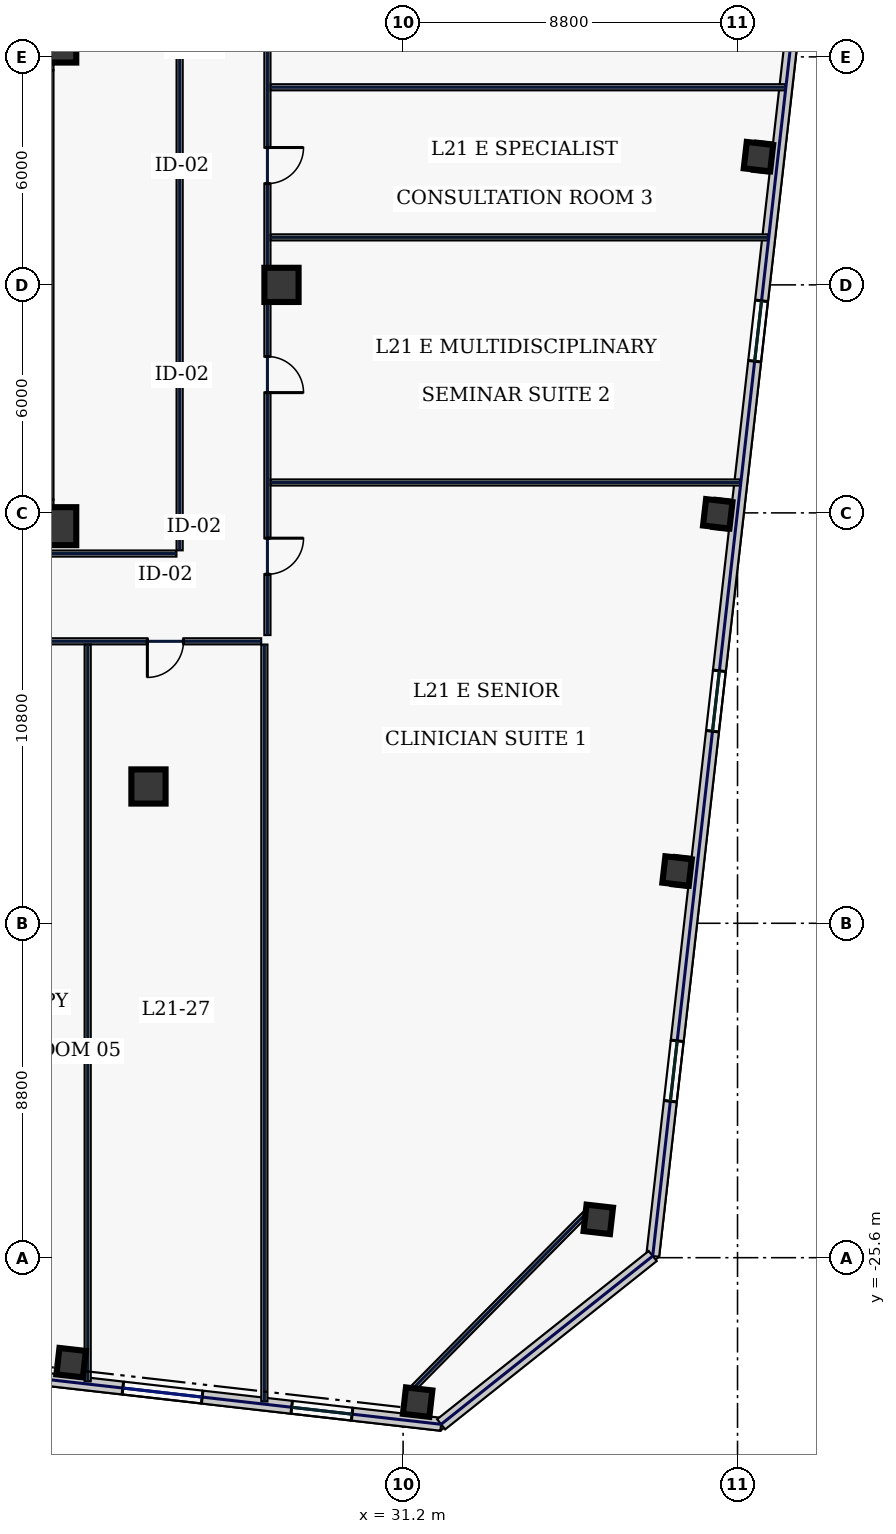
"""IFC4 building model, lengths in metres.
Left out: names, types, materials, properties, quantities, classifications, styles, units other than length and angle.
Written with IfcOpenShell. Run it as: python <this file> out.ifc"""

import sys

from ifc_helpers import new_model, si_unit, direction, frame, frame_2d, origin, origin_2d, place, context, subcontext, project, spatial, rectangle, hollow_rectangle, extrude, element, fill, save


model = new_model("IFC4")
c1 = context("Model", 3, precision=1e-05, world=origin(), true_north=direction((0.0, 1.0)))
c2 = subcontext(c1, "Body", "Model", "MODEL_VIEW")
j1 = project(units=[si_unit("LENGTHUNIT", "METRE"), si_unit("PLANEANGLEUNIT", "RADIAN")], contexts=[c1])
p1 = place(None, origin())
s1 = spatial("IfcSite", under=j1, at=p1, CompositionType="ELEMENT")
p2 = place(p1, origin())
s2 = spatial("IfcBuilding", under=s1, at=p2, CompositionType="ELEMENT")
p3 = place(p2, frame((0.0, 0.0, 97.4)))
s3 = spatial("IfcBuildingStorey", under=s2, at=p3, CompositionType="ELEMENT", Elevation=97.4)
for number, where, z_axis, x_axis in (
    (1, (10.45, 6.0, 0.0), (0.0, 0.0, 1.0), (1.0, 0.0, 0.0)),
    (2, (10.45, -6.0, 0.0), (0.0, 0.0, 1.0), (1.0, 0.0, 0.0)),
):
    element("IfcWall", number, at=place(p3, frame(where, z_axis=z_axis, x_axis=x_axis)), inside=s3, PredefinedType="SHEAR", context=c2, shape_type="SweptSolid", body=[
        extrude(rectangle(XDim=11.55, YDim=0.7, at=frame_2d((5.775, 0.0))), origin(), (0.0, 0.0, 1.0), 3.74),
    ])
p4 = place(p3, frame((21.6, -5.65, 0.0), z_axis=(0.0, 0.0, 1.0), x_axis=(0.0, 1.0, 0.0)))
e3 = element("IfcWall", 3, at=p4, inside=s3, PredefinedType="SHEAR", context=c2, shape_type="SweptSolid", body=[
    extrude(rectangle(XDim=11.3, YDim=0.8, at=frame_2d((5.65, 0.0))), origin(), (0.0, 0.0, 1.0), 3.74),
])
for number, where, z_axis, x_axis in (
    (4, (22.1, -6.35, 0.0), (0.0, 0.0, 1.0), (1.0, 0.0, 0.0)),
    (5, (22.1, 6.35, 0.0), (0.0, 0.0, 1.0), (1.0, 0.0, 0.0)),
):
    element("IfcColumn", number, at=place(p3, frame(where, z_axis=z_axis, x_axis=x_axis)), inside=s3, PredefinedType="COLUMN", context=c2, shape_type="SweptSolid", body=[
        extrude(hollow_rectangle(XDim=1.0, YDim=1.0, WallThickness=0.045, at=origin_2d()), origin(), (0.0, 0.0, 1.0), 3.74),
    ])
for number, where, z_axis, x_axis in (
    (6, (24.5, -13.2, 0.0), (0.0, 0.0, 1.0), (1.0, 0.0, 0.0)),
    (7, (28.0, 0.0, 0.0), (0.0, 0.0, 1.0), (1.0, 0.0, 0.0)),
):
    element("IfcColumn", number, at=place(p3, frame(where, z_axis=z_axis, x_axis=x_axis)), inside=s3, PredefinedType="COLUMN", context=c2, shape_type="SweptSolid", body=[
        extrude(hollow_rectangle(XDim=0.9, YDim=0.9, WallThickness=0.04, at=origin_2d()), origin(), (0.0, 0.0, 1.0), 3.74),
    ])
for number, where, z_axis, x_axis in (
    (8, (22.465, -28.362, 0.0), (0.0, 0.0, 1.0), (0.994, -0.113, 0.0)),
    (9, (31.583, -29.401, 0.0), (0.0, 0.0, 1.0), (0.994, -0.113, 0.0)),
    (10, (36.336, -24.592, 0.0), (0.0, 0.0, 1.0), (0.994, -0.113, 0.0)),
    (11, (38.409, -15.424, 0.0), (0.0, 0.0, 1.0), (0.994, -0.113, 0.0)),
    (12, (39.48, -6.025, 0.0), (0.0, 0.0, 1.0), (0.994, -0.113, 0.0)),
    (13, (40.551, 3.375, 0.0), (0.0, 0.0, 1.0), (0.994, -0.113, 0.0)),
):
    element("IfcColumn", number, at=place(p3, frame(where, z_axis=z_axis, x_axis=x_axis)), inside=s3, PredefinedType="COLUMN", context=c2, shape_type="SweptSolid", body=[
        extrude(hollow_rectangle(XDim=0.7, YDim=0.7, WallThickness=0.032, at=origin_2d()), origin(), (0.0, 0.0, 1.0), 3.74),
    ])
p5 = place(p3, frame((11.115, -27.582, 0.0), z_axis=(0.0, 0.0, 1.0), x_axis=(0.993572655904, -0.113196190044, 0.0)))
e14 = element("IfcWall", 14, at=p5, inside=s3, PredefinedType="STANDARD", context=c2, shape_type="SweptSolid", body=[
    extrude(rectangle(XDim=21.223, YDim=0.34, at=frame_2d((10.611, 0.0))), origin(), (0.0, 0.0, 1.0), 3.74),
])
p6 = place(p5, frame((4.866, 0.0, 0.67)))
e15 = element("IfcOpeningElement", 15, at=p6, cuts=e14, PredefinedType="OPENING", context=c2, shape_type="SweptSolid", body=[
    extrude(rectangle(XDim=0.85, YDim=1.85, at=frame_2d((0.425, 0.925))), frame((0.0, 0.18, 0.0), z_axis=(0.0, -1.0, 0.0), x_axis=(1.0, 0.0, 0.0)), (0.0, 0.0, 1.0), 0.36),
])
p7 = place(p5, frame((7.838, 0.0, 0.67)))
e16 = element("IfcOpeningElement", 16, at=p7, cuts=e14, PredefinedType="OPENING", context=c2, shape_type="SweptSolid", body=[
    extrude(rectangle(XDim=2.1, YDim=2.2, at=frame_2d((1.05, 1.1))), frame((0.0, 0.18, 0.0), z_axis=(0.0, -1.0, 0.0), x_axis=(1.0, 0.0, 0.0)), (0.0, 0.0, 1.0), 0.36),
])
p8 = place(p5, frame((12.794, 0.0, 0.67)))
e17 = element("IfcOpeningElement", 17, at=p8, cuts=e14, PredefinedType="OPENING", context=c2, shape_type="SweptSolid", body=[
    extrude(rectangle(XDim=2.1, YDim=2.2, at=frame_2d((1.05, 1.1))), frame((0.0, 0.18, 0.0), z_axis=(0.0, -1.0, 0.0), x_axis=(1.0, 0.0, 0.0)), (0.0, 0.0, 1.0), 0.36),
])
p9 = place(p5, frame((17.265, 0.0, 0.22)))
e18 = element("IfcOpeningElement", 18, at=p9, cuts=e14, PredefinedType="OPENING", context=c2, shape_type="SweptSolid", body=[
    extrude(rectangle(XDim=1.6, YDim=1.2, at=frame_2d((0.8, 0.6))), frame((0.0, 0.18, 0.0), z_axis=(0.0, -1.0, 0.0), x_axis=(1.0, 0.0, 0.0)), (0.0, 0.0, 1.0), 0.36),
])
p10 = place(p3, frame((37.768, -25.556, 0.0), z_axis=(0.0, 0.0, 1.0), x_axis=(0.113201605824, 0.993572038877, 0.0)))
e19 = element("IfcWall", 19, at=p10, inside=s3, PredefinedType="STANDARD", context=c2, shape_type="SweptSolid", body=[
    extrude(rectangle(XDim=39.2, YDim=0.34, at=frame_2d((19.6, 0.0))), origin(), (0.0, 0.0, 1.0), 3.74),
])
p11 = place(p10, frame((4.1, 0.0, 0.58)))
e20 = element("IfcOpeningElement", 20, at=p11, cuts=e19, PredefinedType="OPENING", context=c2, shape_type="SweptSolid", body=[
    extrude(rectangle(XDim=1.6, YDim=2.3, at=frame_2d((0.8, 1.15))), frame((0.0, 0.18, 0.0), z_axis=(0.0, -1.0, 0.0), x_axis=(1.0, 0.0, 0.0)), (0.0, 0.0, 1.0), 0.36),
])
p12 = place(p10, frame((13.9, 0.0, 0.58)))
e21 = element("IfcOpeningElement", 21, at=p12, cuts=e19, PredefinedType="OPENING", context=c2, shape_type="SweptSolid", body=[
    extrude(rectangle(XDim=1.6, YDim=2.3, at=frame_2d((0.8, 1.15))), frame((0.0, 0.18, 0.0), z_axis=(0.0, -1.0, 0.0), x_axis=(1.0, 0.0, 0.0)), (0.0, 0.0, 1.0), 0.36),
])
p13 = place(p10, frame((23.7, 0.0, 0.58)))
e22 = element("IfcOpeningElement", 22, at=p13, cuts=e19, PredefinedType="OPENING", context=c2, shape_type="SweptSolid", body=[
    extrude(rectangle(XDim=1.6, YDim=2.3, at=frame_2d((0.8, 1.15))), frame((0.0, 0.18, 0.0), z_axis=(0.0, -1.0, 0.0), x_axis=(1.0, 0.0, 0.0)), (0.0, 0.0, 1.0), 0.36),
])
p14 = place(p10, frame((33.5, 0.0, 0.58)))
e23 = element("IfcOpeningElement", 23, at=p14, cuts=e19, PredefinedType="OPENING", context=c2, shape_type="SweptSolid", body=[
    extrude(rectangle(XDim=1.6, YDim=2.3, at=frame_2d((0.8, 1.15))), frame((0.0, 0.18, 0.0), z_axis=(0.0, -1.0, 0.0), x_axis=(1.0, 0.0, 0.0)), (0.0, 0.0, 1.0), 0.36),
])
p15 = place(p3, frame((32.201, -29.985, 0.0), z_axis=(0.0, 0.0, 1.0), x_axis=(0.78261359446, 0.622507800567, 0.0)))
e24 = element("IfcWall", 24, at=p15, inside=s3, PredefinedType="STANDARD", context=c2, shape_type="SweptSolid", body=[
    extrude(rectangle(XDim=7.114, YDim=0.34, at=frame_2d((3.557, 0.0))), origin(), (0.0, 0.0, 1.0), 3.74),
])
p16 = place(p3, frame((31.341, -29.162, 0.0), z_axis=(0.0, 0.0, 1.0), x_axis=(0.702905898933, 0.711282853192, 0.0)))
e25 = element("IfcWall", 25, at=p16, inside=s3, PredefinedType="PARTITIONING", context=c2, shape_type="SweptSolid", body=[
    extrude(rectangle(XDim=6.761, YDim=0.16, at=frame_2d((3.381, 0.0))), origin(), (0.0, 0.0, 1.0), 3.74),
])
p17 = place(p3, frame((27.63, 9.415, 0.0), z_axis=(0.0, 0.0, 1.0), x_axis=(0.0, -1.0, 0.0)))
e26 = element("IfcWall", 26, at=p17, inside=s3, PredefinedType="PARTITIONING", context=c2, shape_type="SweptSolid", body=[
    extrude(rectangle(XDim=18.63, YDim=0.16, at=frame_2d((9.315, 0.0))), origin(), (0.0, 0.0, 1.0), 3.74),
])
p18 = place(p17, frame((16.081, 0.0, 0.0)))
e27 = element("IfcOpeningElement", 27, at=p18, cuts=e26, PredefinedType="OPENING", context=c2, shape_type="SweptSolid", body=[
    extrude(rectangle(XDim=0.95, YDim=2.2, at=frame_2d((0.475, 1.1))), frame((0.0, 0.09, 0.0), z_axis=(0.0, -1.0, 0.0), x_axis=(1.0, 0.0, 0.0)), (0.0, 0.0, 1.0), 0.18),
])
p19 = place(p17, frame((11.3, 0.0, 0.0)))
e28 = element("IfcOpeningElement", 28, at=p19, cuts=e26, PredefinedType="OPENING", context=c2, shape_type="SweptSolid", body=[
    extrude(rectangle(XDim=0.95, YDim=2.2, at=frame_2d((0.475, 1.1))), frame((0.0, 0.09, 0.0), z_axis=(0.0, -1.0, 0.0), x_axis=(1.0, 0.0, 0.0)), (0.0, 0.0, 1.0), 0.18),
])
p20 = place(p17, frame((5.8, 0.0, 0.0)))
e29 = element("IfcOpeningElement", 29, at=p20, cuts=e26, PredefinedType="OPENING", context=c2, shape_type="SweptSolid", body=[
    extrude(rectangle(XDim=0.95, YDim=2.2, at=frame_2d((0.475, 1.1))), frame((0.0, 0.09, 0.0), z_axis=(0.0, -1.0, 0.0), x_axis=(1.0, 0.0, 0.0)), (0.0, 0.0, 1.0), 0.18),
])
p21 = place(p17, frame((1.869, 0.0, 0.0)))
e30 = element("IfcOpeningElement", 30, at=p21, cuts=e26, PredefinedType="OPENING", context=c2, shape_type="SweptSolid", body=[
    extrude(rectangle(XDim=0.95, YDim=2.2, at=frame_2d((0.475, 1.1))), frame((0.0, 0.09, 0.0), z_axis=(0.0, -1.0, 0.0), x_axis=(1.0, 0.0, 0.0)), (0.0, 0.0, 1.0), 0.18),
])
p22 = place(p3, frame((27.465, -9.38, 0.0), z_axis=(0.0, 0.0, 1.0), x_axis=(-1.0, 0.0, 0.0)))
e31 = element("IfcWall", 31, at=p22, inside=s3, PredefinedType="PARTITIONING", context=c2, shape_type="SweptSolid", body=[
    extrude(rectangle(XDim=54.93, YDim=0.16, at=frame_2d((27.465, 0.0))), origin(), (0.0, 0.0, 1.0), 3.74),
])
p23 = place(p22, frame((52.106, 0.0, 0.0)))
e32 = element("IfcOpeningElement", 32, at=p23, cuts=e31, PredefinedType="OPENING", context=c2, shape_type="SweptSolid", body=[
    extrude(rectangle(XDim=1.05, YDim=2.2, at=frame_2d((0.525, 1.1))), frame((0.0, 0.09, 0.0), z_axis=(0.0, -1.0, 0.0), x_axis=(1.0, 0.0, 0.0)), (0.0, 0.0, 1.0), 0.18),
])
p24 = place(p22, frame((46.719, 0.0, 0.0)))
e33 = element("IfcOpeningElement", 33, at=p24, cuts=e31, PredefinedType="OPENING", context=c2, shape_type="SweptSolid", body=[
    extrude(rectangle(XDim=0.95, YDim=2.2, at=frame_2d((0.475, 1.1))), frame((0.0, 0.09, 0.0), z_axis=(0.0, -1.0, 0.0), x_axis=(1.0, 0.0, 0.0)), (0.0, 0.0, 1.0), 0.18),
])
p25 = place(p22, frame((39.46, 0.0, 0.0)))
e34 = element("IfcOpeningElement", 34, at=p25, cuts=e31, PredefinedType="OPENING", context=c2, shape_type="SweptSolid", body=[
    extrude(rectangle(XDim=1.15, YDim=2.2, at=frame_2d((0.575, 1.1))), frame((0.0, 0.09, 0.0), z_axis=(0.0, -1.0, 0.0), x_axis=(1.0, 0.0, 0.0)), (0.0, 0.0, 1.0), 0.18),
])
p26 = place(p22, frame((29.747, 0.0, 0.0)))
e35 = element("IfcOpeningElement", 35, at=p26, cuts=e31, PredefinedType="OPENING", context=c2, shape_type="SweptSolid", body=[
    extrude(rectangle(XDim=0.95, YDim=2.2, at=frame_2d((0.475, 1.1))), frame((0.0, 0.09, 0.0), z_axis=(0.0, -1.0, 0.0), x_axis=(1.0, 0.0, 0.0)), (0.0, 0.0, 1.0), 0.18),
])
p27 = place(p22, frame((21.87, 0.0, 0.0)))
e36 = element("IfcOpeningElement", 36, at=p27, cuts=e31, PredefinedType="OPENING", context=c2, shape_type="SweptSolid", body=[
    extrude(rectangle(XDim=0.95, YDim=2.2, at=frame_2d((0.475, 1.1))), frame((0.0, 0.09, 0.0), z_axis=(0.0, -1.0, 0.0), x_axis=(1.0, 0.0, 0.0)), (0.0, 0.0, 1.0), 0.18),
])
p28 = place(p22, frame((15.11, 0.0, 0.0)))
e37 = element("IfcOpeningElement", 37, at=p28, cuts=e31, PredefinedType="OPENING", context=c2, shape_type="SweptSolid", body=[
    extrude(rectangle(XDim=1.05, YDim=2.2, at=frame_2d((0.525, 1.1))), frame((0.0, 0.09, 0.0), z_axis=(0.0, -1.0, 0.0), x_axis=(1.0, 0.0, 0.0)), (0.0, 0.0, 1.0), 0.18),
])
p29 = place(p22, frame((8.065, 0.0, 0.0)))
e38 = element("IfcOpeningElement", 38, at=p29, cuts=e31, PredefinedType="OPENING", context=c2, shape_type="SweptSolid", body=[
    extrude(rectangle(XDim=0.95, YDim=2.2, at=frame_2d((0.475, 1.1))), frame((0.0, 0.09, 0.0), z_axis=(0.0, -1.0, 0.0), x_axis=(1.0, 0.0, 0.0)), (0.0, 0.0, 1.0), 0.18),
])
p30 = place(p22, frame((2.044, 0.0, 0.0)))
e39 = element("IfcOpeningElement", 39, at=p30, cuts=e31, PredefinedType="OPENING", context=c2, shape_type="SweptSolid", body=[
    extrude(rectangle(XDim=0.95, YDim=2.2, at=frame_2d((0.475, 1.1))), frame((0.0, 0.09, 0.0), z_axis=(0.0, -1.0, 0.0), x_axis=(1.0, 0.0, 0.0)), (0.0, 0.0, 1.0), 0.18),
])
p31 = place(p3, frame((10.665, -7.07, 0.0), z_axis=(0.0, 0.0, 1.0), x_axis=(1.0, 0.0, 0.0)))
e40 = element("IfcWall", 40, at=p31, inside=s3, PredefinedType="PARTITIONING", context=c2, shape_type="SweptSolid", body=[
    extrude(rectangle(XDim=14.57, YDim=0.16, at=frame_2d((7.285, 0.0))), origin(), (0.0, 0.0, 1.0), 3.74),
])
p32 = place(p3, frame((25.32, -6.985, 0.0), z_axis=(0.0, 0.0, 1.0), x_axis=(0.0, 1.0, 0.0)))
e41 = element("IfcWall", 41, at=p32, inside=s3, PredefinedType="PARTITIONING", context=c2, shape_type="SweptSolid", body=[
    extrude(rectangle(XDim=14.17, YDim=0.16, at=frame_2d((7.085, 0.0))), origin(), (0.0, 0.0, 1.0), 3.74),
])
p33 = place(p3, frame((27.55, -29.385, 0.0), z_axis=(0.0, 0.0, 1.0), x_axis=(0.0, 1.0, 0.0)))
e42 = element("IfcWall", 42, at=p33, inside=s3, PredefinedType="PARTITIONING", context=c2, shape_type="SweptSolid", body=[
    extrude(rectangle(XDim=19.919, YDim=0.16, at=frame_2d((9.96, 0.0))), origin(), (0.0, 0.0, 1.0), 3.74),
])
p34 = place(p3, frame((22.9, -28.854, 0.0), z_axis=(0.0, 0.0, 1.0), x_axis=(0.0, 1.0, 0.0)))
e43 = element("IfcWall", 43, at=p34, inside=s3, PredefinedType="PARTITIONING", context=c2, shape_type="SweptSolid", body=[
    extrude(rectangle(XDim=19.389, YDim=0.16, at=frame_2d((9.695, 0.0))), origin(), (0.0, 0.0, 1.0), 3.235),
])
p35 = place(p3, frame((27.715, -5.2, 0.0), z_axis=(0.0, 0.0, 1.0), x_axis=(1.0, 0.0, 0.0)))
e44 = element("IfcWall", 44, at=p35, inside=s3, PredefinedType="PARTITIONING", context=c2, shape_type="SweptSolid", body=[
    extrude(rectangle(XDim=12.352, YDim=0.16, at=frame_2d((6.176, 0.0))), origin(), (0.0, 0.0, 1.0), 3.74),
])
p36 = place(p3, frame((27.715, 1.25, 0.0), z_axis=(0.0, 0.0, 1.0), x_axis=(1.0, 0.0, 0.0)))
e45 = element("IfcWall", 45, at=p36, inside=s3, PredefinedType="PARTITIONING", context=c2, shape_type="SweptSolid", body=[
    extrude(rectangle(XDim=13.087, YDim=0.16, at=frame_2d((6.543, 0.0))), origin(), (0.0, 0.0, 1.0), 3.235),
])
p37 = place(p3, frame((27.715, 5.2, 0.0), z_axis=(0.0, 0.0, 1.0), x_axis=(1.0, 0.0, 0.0)))
e46 = element("IfcWall", 46, at=p37, inside=s3, PredefinedType="PARTITIONING", context=c2, shape_type="SweptSolid", body=[
    extrude(rectangle(XDim=13.537, YDim=0.16, at=frame_2d((6.769, 0.0))), origin(), (0.0, 0.0, 1.0), 3.74),
])
p38 = place(p8, origin())
e47 = element("IfcWindow", 47, at=p38, inside=s3, PartitioningType="SINGLE_PANEL", PredefinedType="WINDOW", context=c2, shape_type="SweptSolid", body=[
    extrude(rectangle(XDim=2.1, YDim=2.2, at=frame_2d((1.05, 1.1))), frame((0.0, 0.03, 0.0), z_axis=(0.0, -1.0, 0.0), x_axis=(1.0, 0.0, 0.0)), (0.0, 0.0, 1.0), 0.06),
])
fill(e17, e47)
p39 = place(p9, origin())
e48 = element("IfcWindow", 48, at=p39, inside=s3, PartitioningType="SINGLE_PANEL", PredefinedType="WINDOW", context=c2, shape_type="SweptSolid", body=[
    extrude(rectangle(XDim=1.6, YDim=1.2, at=frame_2d((0.8, 0.6))), frame((0.0, 0.03, 0.0), z_axis=(0.0, -1.0, 0.0), x_axis=(1.0, 0.0, 0.0)), (0.0, 0.0, 1.0), 0.06),
])
fill(e18, e48)
p40 = place(p11, origin())
e49 = element("IfcWindow", 49, at=p40, inside=s3, PartitioningType="SINGLE_PANEL", PredefinedType="WINDOW", context=c2, shape_type="SweptSolid", body=[
    extrude(rectangle(XDim=1.6, YDim=2.3, at=frame_2d((0.8, 1.15))), frame((0.0, 0.03, 0.0), z_axis=(0.0, -1.0, 0.0), x_axis=(1.0, 0.0, 0.0)), (0.0, 0.0, 1.0), 0.06),
])
fill(e20, e49)
p41 = place(p12, origin())
e50 = element("IfcWindow", 50, at=p41, inside=s3, PartitioningType="SINGLE_PANEL", PredefinedType="WINDOW", context=c2, shape_type="SweptSolid", body=[
    extrude(rectangle(XDim=1.6, YDim=2.3, at=frame_2d((0.8, 1.15))), frame((0.0, 0.03, 0.0), z_axis=(0.0, -1.0, 0.0), x_axis=(1.0, 0.0, 0.0)), (0.0, 0.0, 1.0), 0.06),
])
fill(e21, e50)
p42 = place(p13, origin())
e51 = element("IfcWindow", 51, at=p42, inside=s3, PartitioningType="SINGLE_PANEL", PredefinedType="WINDOW", context=c2, shape_type="SweptSolid", body=[
    extrude(rectangle(XDim=1.6, YDim=2.3, at=frame_2d((0.8, 1.15))), frame((0.0, 0.03, 0.0), z_axis=(0.0, -1.0, 0.0), x_axis=(1.0, 0.0, 0.0)), (0.0, 0.0, 1.0), 0.06),
])
fill(e22, e51)
p43 = place(p30, origin())
e52 = element("IfcDoor", 52, at=p43, inside=s3, OperationType="SINGLE_SWING_RIGHT", PredefinedType="DOOR", context=c2, shape_type="SweptSolid", body=[
    extrude(rectangle(XDim=0.95, YDim=2.2, at=frame_2d((0.475, 1.1))), frame((0.0, 0.025, 0.0), z_axis=(0.0, -1.0, 0.0), x_axis=(1.0, 0.0, 0.0)), (0.0, 0.0, 1.0), 0.05),
])
fill(e39, e52)
p44 = place(p18, origin())
e53 = element("IfcDoor", 53, at=p44, inside=s3, OperationType="SINGLE_SWING_LEFT", PredefinedType="DOOR", context=c2, shape_type="SweptSolid", body=[
    extrude(rectangle(XDim=0.95, YDim=2.2, at=frame_2d((0.475, 1.1))), frame((0.0, 0.025, 0.0), z_axis=(0.0, -1.0, 0.0), x_axis=(1.0, 0.0, 0.0)), (0.0, 0.0, 1.0), 0.05),
])
fill(e27, e53)
p45 = place(p19, origin())
e54 = element("IfcDoor", 54, at=p45, inside=s3, OperationType="SINGLE_SWING_RIGHT", PredefinedType="DOOR", context=c2, shape_type="SweptSolid", body=[
    extrude(rectangle(XDim=0.95, YDim=2.2, at=frame_2d((0.475, 1.1))), frame((0.0, 0.025, 0.0), z_axis=(0.0, -1.0, 0.0), x_axis=(1.0, 0.0, 0.0)), (0.0, 0.0, 1.0), 0.05),
])
fill(e28, e54)
p46 = place(p20, origin())
e55 = element("IfcDoor", 55, at=p46, inside=s3, OperationType="SINGLE_SWING_LEFT", PredefinedType="DOOR", context=c2, shape_type="SweptSolid", body=[
    extrude(rectangle(XDim=0.95, YDim=2.2, at=frame_2d((0.475, 1.1))), frame((0.0, 0.025, 0.0), z_axis=(0.0, -1.0, 0.0), x_axis=(1.0, 0.0, 0.0)), (0.0, 0.0, 1.0), 0.05),
])
fill(e29, e55)
save(model, sys.argv[1])
